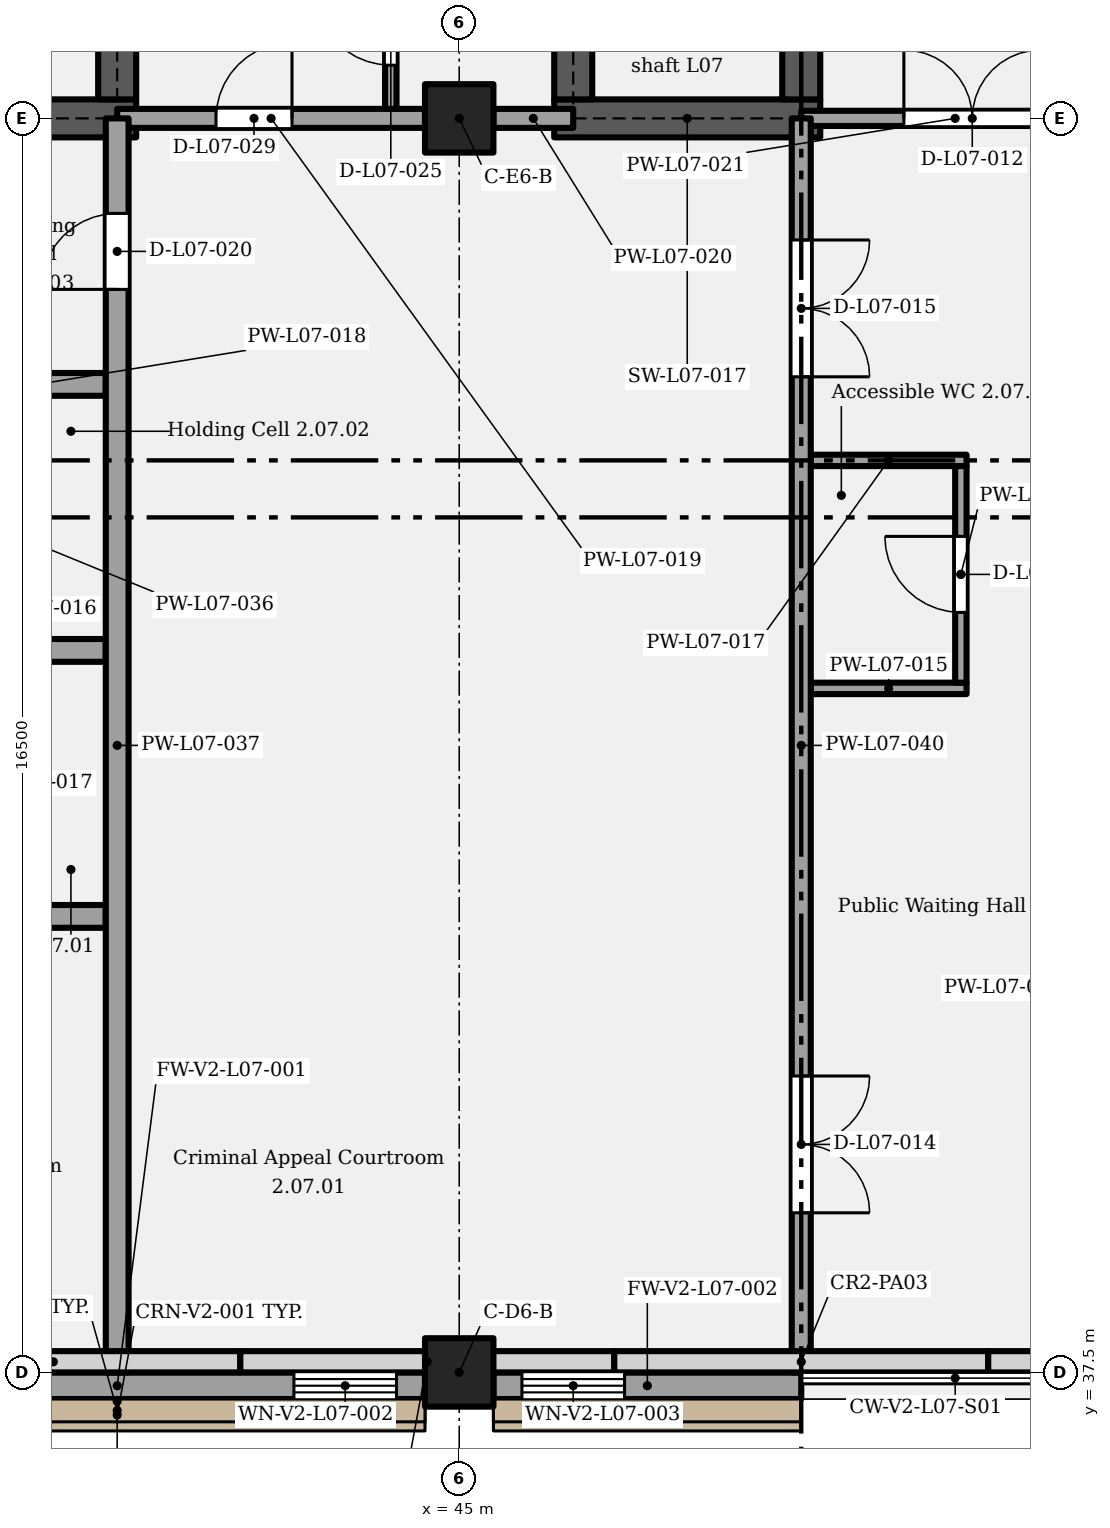
"""IFC4 building model, lengths in metres.
Left out: names, types, materials, properties, quantities, classifications, styles, units other than length and angle.
Written with IfcOpenShell. Run it as: python <this file> out.ifc"""

import sys

from ifc_helpers import new_model, si_unit, direction, frame, frame_2d, origin, origin_2d, place, context, subcontext, project, spatial, rectangle, extrude, element, fill, save


model = new_model("IFC4")
c1 = context("Model", 3, precision=1e-05, world=origin(), true_north=direction((0.0, 1.0)))
c2 = subcontext(c1, "Body", "Model", "MODEL_VIEW")
j1 = project(units=[si_unit("LENGTHUNIT", "METRE"), si_unit("PLANEANGLEUNIT", "RADIAN")], contexts=[c1])
p1 = place(None, origin())
s1 = spatial("IfcSite", under=j1, at=p1, CompositionType="ELEMENT")
p2 = place(p1, origin())
s2 = spatial("IfcBuilding", under=s1, at=p2, CompositionType="ELEMENT")
p3 = place(p2, frame((0.0, 0.0, 39.0)))
s3 = spatial("IfcBuildingStorey", under=s2, at=p3, CompositionType="ELEMENT", Elevation=39.0)
for number, where, z_axis, x_axis in (
    (1, (45.0, 37.5, 0.0), (0.0, 0.0, 1.0), (1.0, 0.0, 0.0)),
    (2, (45.0, 54.0, 0.0), (0.0, 0.0, 1.0), (1.0, 0.0, 0.0)),
):
    element("IfcColumn", number, at=place(p3, frame(where, z_axis=z_axis, x_axis=x_axis)), inside=s3, PredefinedType="COLUMN", context=c2, shape_type="SweptSolid", body=[
        extrude(rectangle(XDim=0.9, YDim=0.9, at=origin_2d()), origin(), (0.0, 0.0, 1.0), 5.4),
    ])
p4 = place(p3, frame((38.15, 54.0, 0.0), z_axis=(0.0, 0.0, 1.0), x_axis=(1.0, 0.0, 0.0)))
e3 = element("IfcWall", 3, at=p4, inside=s3, PredefinedType="SHEAR", context=c2, shape_type="SweptSolid", body=[
    extrude(rectangle(XDim=2.6, YDim=0.5, at=frame_2d((1.3, 0.0))), origin(), (0.0, 0.0, 1.0), 5.15),
])
p5 = place(p3, frame((46.25, 54.0, 0.0), z_axis=(0.0, 0.0, 1.0), x_axis=(1.0, 0.0, 0.0)))
e4 = element("IfcWall", 4, at=p5, inside=s3, PredefinedType="SHEAR", context=c2, shape_type="SweptSolid", body=[
    extrude(rectangle(XDim=3.5, YDim=0.5, at=frame_2d((1.75, 0.0))), origin(), (0.0, 0.0, 1.0), 5.15),
])
p6 = place(p3, frame((40.5, 54.25, 0.0), z_axis=(0.0, 0.0, 1.0), x_axis=(0.0, 1.0, 0.0)))
e5 = element("IfcWall", 5, at=p6, inside=s3, PredefinedType="SHEAR", context=c2, shape_type="SweptSolid", body=[
    extrude(rectangle(XDim=11.5, YDim=0.5, at=frame_2d((5.75, 0.0))), origin(), (0.0, 0.0, 1.0), 5.15),
])
p7 = place(p3, frame((46.5, 54.25, 0.0), z_axis=(0.0, 0.0, 1.0), x_axis=(0.0, 1.0, 0.0)))
e6 = element("IfcWall", 6, at=p7, inside=s3, PredefinedType="SHEAR", context=c2, shape_type="SweptSolid", body=[
    extrude(rectangle(XDim=2.5, YDim=0.5, at=frame_2d((1.25, 0.0))), origin(), (0.0, 0.0, 1.0), 5.15),
])
p8 = place(p3, frame((49.5, 54.25, 0.0), z_axis=(0.0, 0.0, 1.0), x_axis=(0.0, 1.0, 0.0)))
e7 = element("IfcWall", 7, at=p8, inside=s3, PredefinedType="SHEAR", context=c2, shape_type="SweptSolid", body=[
    extrude(rectangle(XDim=11.5, YDim=0.5, at=frame_2d((5.75, 0.0))), origin(), (0.0, 0.0, 1.0), 5.15),
])
p9 = place(p8, frame((0.7, 0.0, 0.0)))
e8 = element("IfcOpeningElement", 8, at=p9, cuts=e7, PredefinedType="OPENING", context=c2, shape_type="SweptSolid", body=[
    extrude(rectangle(XDim=1.1, YDim=2.1, at=frame_2d((0.55, 1.05))), frame((0.0, 0.26, 0.0), z_axis=(0.0, -1.0, 0.0), x_axis=(1.0, 0.0, 0.0)), (0.0, 0.0, 1.0), 0.52),
])
p10 = place(p8, frame((4.35, 0.0, 0.0), z_axis=(0.0, 0.0, 1.0), x_axis=(-1.0, 0.0, 0.0)))
e9 = element("IfcOpeningElement", 9, at=p10, cuts=e7, PredefinedType="OPENING", context=c2, shape_type="SweptSolid", body=[
    extrude(rectangle(XDim=1.2, YDim=2.1, at=frame_2d((0.6, 1.05))), frame((0.0, 0.26, 0.0), z_axis=(0.0, -1.0, 0.0), x_axis=(1.0, 0.0, 0.0)), (0.0, 0.0, 1.0), 0.52),
])
p11 = place(p3, frame((36.45, 37.325, 0.0), z_axis=(0.0, 0.0, 1.0), x_axis=(1.0, 0.0, 0.0)))
e10 = element("IfcWall", 10, at=p11, inside=s3, PredefinedType="SOLIDWALL", context=c2, shape_type="SweptSolid", body=[
    extrude(rectangle(XDim=8.1, YDim=0.35, at=frame_2d((4.05, 0.0))), origin(), (0.0, 0.0, 1.0), 5.15),
])
p12 = place(p11, frame((0.375, 0.0, 1.2)))
e11 = element("IfcOpeningElement", 11, at=p12, cuts=e10, PredefinedType="OPENING", context=c2, shape_type="SweptSolid", body=[
    extrude(rectangle(XDim=1.35, YDim=3.0, at=frame_2d((0.675, 1.5))), frame((0.0, 0.185, 0.0), z_axis=(0.0, -1.0, 0.0), x_axis=(1.0, 0.0, 0.0)), (0.0, 0.0, 1.0), 0.37),
])
p13 = place(p11, frame((6.375, 0.0, 1.2)))
e12 = element("IfcOpeningElement", 12, at=p13, cuts=e10, PredefinedType="OPENING", context=c2, shape_type="SweptSolid", body=[
    extrude(rectangle(XDim=1.35, YDim=3.0, at=frame_2d((0.675, 1.5))), frame((0.0, 0.185, 0.0), z_axis=(0.0, -1.0, 0.0), x_axis=(1.0, 0.0, 0.0)), (0.0, 0.0, 1.0), 0.37),
])
p14 = place(p3, frame((45.45, 37.325, 0.0), z_axis=(0.0, 0.0, 1.0), x_axis=(1.0, 0.0, 0.0)))
e13 = element("IfcWall", 13, at=p14, inside=s3, PredefinedType="SOLIDWALL", context=c2, shape_type="SweptSolid", body=[
    extrude(rectangle(XDim=4.05, YDim=0.35, at=frame_2d((2.025, 0.0))), origin(), (0.0, 0.0, 1.0), 5.15),
])
p15 = place(p14, frame((0.375, 0.0, 1.2)))
e14 = element("IfcOpeningElement", 14, at=p15, cuts=e13, PredefinedType="OPENING", context=c2, shape_type="SweptSolid", body=[
    extrude(rectangle(XDim=1.35, YDim=3.0, at=frame_2d((0.675, 1.5))), frame((0.0, 0.185, 0.0), z_axis=(0.0, -1.0, 0.0), x_axis=(1.0, 0.0, 0.0)), (0.0, 0.0, 1.0), 0.37),
])
p16 = place(p3, frame((37.2, 37.64, 5.4), z_axis=(0.0, 0.0, 1.0), x_axis=(1.0, 0.0, 0.0)))
e15 = element("IfcWall", 15, at=p16, inside=s3, PredefinedType="PARAPET", context=c2, shape_type="SweptSolid", body=[
    extrude(rectangle(XDim=4.92, YDim=0.28, at=frame_2d((2.46, 0.0))), origin(), (0.0, 0.0, 1.0), 1.2),
])
p17 = place(p3, frame((42.12, 37.64, 5.4), z_axis=(0.0, 0.0, 1.0), x_axis=(1.0, 0.0, 0.0)))
e16 = element("IfcWall", 16, at=p17, inside=s3, PredefinedType="PARAPET", context=c2, shape_type="SweptSolid", body=[
    extrude(rectangle(XDim=4.92, YDim=0.28, at=frame_2d((2.46, 0.0))), origin(), (0.0, 0.0, 1.0), 1.4),
])
p18 = place(p3, frame((47.04, 37.64, 5.4), z_axis=(0.0, 0.0, 1.0), x_axis=(1.0, 0.0, 0.0)))
e17 = element("IfcWall", 17, at=p18, inside=s3, PredefinedType="PARAPET", context=c2, shape_type="SweptSolid", body=[
    extrude(rectangle(XDim=4.92, YDim=0.28, at=frame_2d((2.46, 0.0))), origin(), (0.0, 0.0, 1.0), 1.6),
])
p19 = place(p3, frame((51.96, 37.64, 5.4), z_axis=(0.0, 0.0, 1.0), x_axis=(1.0, 0.0, 0.0)))
e18 = element("IfcWall", 18, at=p19, inside=s3, PredefinedType="PARAPET", context=c2, shape_type="SweptSolid", body=[
    extrude(rectangle(XDim=4.92, YDim=0.28, at=frame_2d((2.46, 0.0))), origin(), (0.0, 0.0, 1.0), 1.4),
])
p20 = place(p3, frame((36.0, 43.5, 0.0), z_axis=(0.0, 0.0, 1.0), x_axis=(1.0, 0.0, 0.0)))
e19 = element("IfcWall", 19, at=p20, inside=s3, PredefinedType="PARTITIONING", context=c2, shape_type="SweptSolid", body=[
    extrude(rectangle(XDim=4.35, YDim=0.3, at=frame_2d((2.175, 0.0))), origin(), (0.0, 0.0, 1.0), 5.15),
])
p21 = place(p20, frame((1.35, 0.0, 0.0), z_axis=(0.0, 0.0, 1.0), x_axis=(-1.0, 0.0, 0.0)))
e20 = element("IfcOpeningElement", 20, at=p21, cuts=e19, PredefinedType="OPENING", context=c2, shape_type="SweptSolid", body=[
    extrude(rectangle(XDim=0.9, YDim=2.1, at=frame_2d((0.45, 1.05))), frame((0.0, 0.16, 0.0), z_axis=(0.0, -1.0, 0.0), x_axis=(1.0, 0.0, 0.0)), (0.0, 0.0, 1.0), 0.32),
])
p22 = place(p3, frame((49.625, 46.5, 0.0), z_axis=(0.0, 0.0, 1.0), x_axis=(1.0, 0.0, 0.0)))
e21 = element("IfcWall", 21, at=p22, inside=s3, PredefinedType="PARTITIONING", context=c2, shape_type="SweptSolid", body=[
    extrude(rectangle(XDim=2.05, YDim=0.15, at=frame_2d((1.025, 0.0))), origin(), (0.0, 0.0, 1.0), 5.15),
])
p23 = place(p3, frame((38.55, 47.0, 0.0), z_axis=(0.0, 0.0, 1.0), x_axis=(1.0, 0.0, 0.0)))
e22 = element("IfcWall", 22, at=p23, inside=s3, PredefinedType="PARTITIONING", context=c2, shape_type="SweptSolid", body=[
    extrude(rectangle(XDim=1.8, YDim=0.3, at=frame_2d((0.9, 0.0))), origin(), (0.0, 0.0, 1.0), 5.15),
])
p24 = place(p3, frame((49.625, 49.5, 0.0), z_axis=(0.0, 0.0, 1.0), x_axis=(1.0, 0.0, 0.0)))
e23 = element("IfcWall", 23, at=p24, inside=s3, PredefinedType="PARTITIONING", context=c2, shape_type="SweptSolid", body=[
    extrude(rectangle(XDim=2.05, YDim=0.15, at=frame_2d((1.025, 0.0))), origin(), (0.0, 0.0, 1.0), 5.15),
])
p25 = place(p3, frame((38.55, 50.5, 0.0), z_axis=(0.0, 0.0, 1.0), x_axis=(1.0, 0.0, 0.0)))
e24 = element("IfcWall", 24, at=p25, inside=s3, PredefinedType="PARTITIONING", context=c2, shape_type="SweptSolid", body=[
    extrude(rectangle(XDim=1.8, YDim=0.3, at=frame_2d((0.9, 0.0))), origin(), (0.0, 0.0, 1.0), 5.15),
])
p26 = place(p3, frame((40.5, 54.0, 0.0), z_axis=(0.0, 0.0, 1.0), x_axis=(1.0, 0.0, 0.0)))
e25 = element("IfcWall", 25, at=p26, inside=s3, PredefinedType="PARTITIONING", context=c2, shape_type="SweptSolid", body=[
    extrude(rectangle(XDim=4.05, YDim=0.25, at=frame_2d((2.025, 0.0))), origin(), (0.0, 0.0, 1.0), 4.4),
])
p27 = place(p26, frame((1.3, 0.0, 0.0)))
e26 = element("IfcOpeningElement", 26, at=p27, cuts=e25, PredefinedType="OPENING", context=c2, shape_type="SweptSolid", body=[
    extrude(rectangle(XDim=1.0, YDim=2.1, at=frame_2d((0.5, 1.05))), frame((0.0, 0.135, 0.0), z_axis=(0.0, -1.0, 0.0), x_axis=(1.0, 0.0, 0.0)), (0.0, 0.0, 1.0), 0.27),
])
p28 = place(p3, frame((45.45, 54.0, 0.0), z_axis=(0.0, 0.0, 1.0), x_axis=(1.0, 0.0, 0.0)))
e27 = element("IfcWall", 27, at=p28, inside=s3, PredefinedType="PARTITIONING", context=c2, shape_type="SweptSolid", body=[
    extrude(rectangle(XDim=1.05, YDim=0.25, at=frame_2d((0.525, 0.0))), origin(), (0.0, 0.0, 1.0), 4.4),
])
p29 = place(p3, frame((49.5, 54.0, 0.0), z_axis=(0.0, 0.0, 1.0), x_axis=(1.0, 0.0, 0.0)))
e28 = element("IfcWall", 28, at=p29, inside=s3, PredefinedType="PARTITIONING", context=c2, shape_type="SweptSolid", body=[
    extrude(rectangle(XDim=4.05, YDim=0.2, at=frame_2d((2.025, 0.0))), origin(), (0.0, 0.0, 1.0), 4.4),
])
p30 = place(p29, frame((1.35, 0.0, 0.0)))
e29 = element("IfcOpeningElement", 29, at=p30, cuts=e28, PredefinedType="OPENING", context=c2, shape_type="SweptSolid", body=[
    extrude(rectangle(XDim=1.8, YDim=2.1, at=frame_2d((0.9, 1.05))), frame((0.0, 0.11, 0.0), z_axis=(0.0, -1.0, 0.0), x_axis=(1.0, 0.0, 0.0)), (0.0, 0.0, 1.0), 0.22),
])
p31 = place(p3, frame((40.5, 37.5, 0.0), z_axis=(0.0, 0.0, 1.0), x_axis=(0.0, 1.0, 0.0)))
e30 = element("IfcWall", 30, at=p31, inside=s3, PredefinedType="PARTITIONING", context=c2, shape_type="SweptSolid", body=[
    extrude(rectangle(XDim=16.5, YDim=0.3, at=frame_2d((8.25, 0.0))), origin(), (0.0, 0.0, 1.0), 5.15),
])
p32 = place(p31, frame((14.25, 0.0, 0.0)))
e31 = element("IfcOpeningElement", 31, at=p32, cuts=e30, PredefinedType="OPENING", context=c2, shape_type="SweptSolid", body=[
    extrude(rectangle(XDim=1.0, YDim=2.0, at=frame_2d((0.5, 1.0))), frame((0.0, 0.16, 0.0), z_axis=(0.0, -1.0, 0.0), x_axis=(1.0, 0.0, 0.0)), (0.0, 0.0, 1.0), 0.32),
])
p33 = place(p3, frame((44.1, 54.125, 0.0), z_axis=(0.0, 0.0, 1.0), x_axis=(0.0, 1.0, 0.0)))
e32 = element("IfcWall", 32, at=p33, inside=s3, PredefinedType="PARTITIONING", context=c2, shape_type="SweptSolid", body=[
    extrude(rectangle(XDim=8.8, YDim=0.15, at=frame_2d((4.4, 0.0))), origin(), (0.0, 0.0, 1.0), 5.15),
])
p34 = place(p33, frame((0.575, 0.0, 0.0)))
e33 = element("IfcOpeningElement", 33, at=p34, cuts=e32, PredefinedType="OPENING", context=c2, shape_type="SweptSolid", body=[
    extrude(rectangle(XDim=1.0, YDim=2.1, at=frame_2d((0.5, 1.05))), frame((0.0, 0.085, 0.0), z_axis=(0.0, -1.0, 0.0), x_axis=(1.0, 0.0, 0.0)), (0.0, 0.0, 1.0), 0.17),
])
p35 = place(p33, frame((5.425, 0.0, 0.0)))
e34 = element("IfcOpeningElement", 34, at=p35, cuts=e32, PredefinedType="OPENING", context=c2, shape_type="SweptSolid", body=[
    extrude(rectangle(XDim=0.9, YDim=2.1, at=frame_2d((0.45, 1.05))), frame((0.0, 0.085, 0.0), z_axis=(0.0, -1.0, 0.0), x_axis=(1.0, 0.0, 0.0)), (0.0, 0.0, 1.0), 0.17),
])
p36 = place(p3, frame((49.5, 37.5, 0.0), z_axis=(0.0, 0.0, 1.0), x_axis=(0.0, 1.0, 0.0)))
e35 = element("IfcWall", 35, at=p36, inside=s3, PredefinedType="PARTITIONING", context=c2, shape_type="SweptSolid", body=[
    extrude(rectangle(XDim=16.5, YDim=0.25, at=frame_2d((8.25, 0.0))), origin(), (0.0, 0.0, 1.0), 5.15),
])
p37 = place(p36, frame((3.9, 0.0, 0.0), z_axis=(0.0, 0.0, 1.0), x_axis=(-1.0, 0.0, 0.0)))
e36 = element("IfcOpeningElement", 36, at=p37, cuts=e35, PredefinedType="OPENING", context=c2, shape_type="SweptSolid", body=[
    extrude(rectangle(XDim=1.8, YDim=2.4, at=frame_2d((0.9, 1.2))), frame((0.0, 0.135, 0.0), z_axis=(0.0, -1.0, 0.0), x_axis=(1.0, 0.0, 0.0)), (0.0, 0.0, 1.0), 0.27),
])
p38 = place(p36, frame((14.9, 0.0, 0.0), z_axis=(0.0, 0.0, 1.0), x_axis=(-1.0, 0.0, 0.0)))
e37 = element("IfcOpeningElement", 37, at=p38, cuts=e35, PredefinedType="OPENING", context=c2, shape_type="SweptSolid", body=[
    extrude(rectangle(XDim=1.8, YDim=2.4, at=frame_2d((0.9, 1.2))), frame((0.0, 0.135, 0.0), z_axis=(0.0, -1.0, 0.0), x_axis=(1.0, 0.0, 0.0)), (0.0, 0.0, 1.0), 0.27),
])
p39 = place(p3, frame((51.6, 46.575, 0.0), z_axis=(0.0, 0.0, 1.0), x_axis=(0.0, 1.0, 0.0)))
e38 = element("IfcWall", 38, at=p39, inside=s3, PredefinedType="PARTITIONING", context=c2, shape_type="SweptSolid", body=[
    extrude(rectangle(XDim=2.85, YDim=0.15, at=frame_2d((1.425, 0.0))), origin(), (0.0, 0.0, 1.0), 5.15),
])
p40 = place(p39, frame((0.925, 0.0, 0.0)))
e39 = element("IfcOpeningElement", 39, at=p40, cuts=e38, PredefinedType="OPENING", context=c2, shape_type="SweptSolid", body=[
    extrude(rectangle(XDim=1.0, YDim=2.1, at=frame_2d((0.5, 1.05))), frame((0.0, 0.085, 0.0), z_axis=(0.0, -1.0, 0.0), x_axis=(1.0, 0.0, 0.0)), (0.0, 0.0, 1.0), 0.17),
])
p41 = place(p13, origin())
e40 = element("IfcWindow", 40, at=p41, inside=s3, PartitioningType="SINGLE_PANEL", PredefinedType="WINDOW", context=c2, shape_type="SweptSolid", body=[
    extrude(rectangle(XDim=1.35, YDim=3.0, at=frame_2d((0.675, 1.5))), frame((0.0, 0.03, 0.0), z_axis=(0.0, -1.0, 0.0), x_axis=(1.0, 0.0, 0.0)), (0.0, 0.0, 1.0), 0.06),
])
fill(e12, e40)
p42 = place(p15, origin())
e41 = element("IfcWindow", 41, at=p42, inside=s3, PartitioningType="SINGLE_PANEL", PredefinedType="WINDOW", context=c2, shape_type="SweptSolid", body=[
    extrude(rectangle(XDim=1.35, YDim=3.0, at=frame_2d((0.675, 1.5))), frame((0.0, 0.03, 0.0), z_axis=(0.0, -1.0, 0.0), x_axis=(1.0, 0.0, 0.0)), (0.0, 0.0, 1.0), 0.06),
])
fill(e14, e41)
p43 = place(p30, origin())
e42 = element("IfcDoor", 42, at=p43, inside=s3, OperationType="DOUBLE_DOOR_SINGLE_SWING", PredefinedType="DOOR", context=c2, shape_type="SweptSolid", body=[
    extrude(rectangle(XDim=1.8, YDim=2.1, at=frame_2d((0.9, 1.05))), frame((0.0, 0.025, 0.0), z_axis=(0.0, -1.0, 0.0), x_axis=(1.0, 0.0, 0.0)), (0.0, 0.0, 1.0), 0.05),
])
fill(e29, e42)
p44 = place(p40, origin())
e43 = element("IfcDoor", 43, at=p44, inside=s3, OperationType="SINGLE_SWING_RIGHT", PredefinedType="DOOR", context=c2, shape_type="SweptSolid", body=[
    extrude(rectangle(XDim=1.0, YDim=2.1, at=frame_2d((0.5, 1.05))), frame((0.0, 0.025, 0.0), z_axis=(0.0, -1.0, 0.0), x_axis=(1.0, 0.0, 0.0)), (0.0, 0.0, 1.0), 0.05),
])
fill(e39, e43)
p45 = place(p37, origin())
e44 = element("IfcDoor", 44, at=p45, inside=s3, OperationType="DOUBLE_DOOR_SINGLE_SWING", PredefinedType="DOOR", context=c2, shape_type="SweptSolid", body=[
    extrude(rectangle(XDim=1.8, YDim=2.4, at=frame_2d((0.9, 1.2))), frame((0.0, 0.025, 0.0), z_axis=(0.0, -1.0, 0.0), x_axis=(1.0, 0.0, 0.0)), (0.0, 0.0, 1.0), 0.05),
])
fill(e36, e44)
p46 = place(p38, origin())
e45 = element("IfcDoor", 45, at=p46, inside=s3, OperationType="DOUBLE_DOOR_SINGLE_SWING", PredefinedType="DOOR", context=c2, shape_type="SweptSolid", body=[
    extrude(rectangle(XDim=1.8, YDim=2.4, at=frame_2d((0.9, 1.2))), frame((0.0, 0.025, 0.0), z_axis=(0.0, -1.0, 0.0), x_axis=(1.0, 0.0, 0.0)), (0.0, 0.0, 1.0), 0.05),
])
fill(e37, e45)
p47 = place(p32, origin())
e46 = element("IfcDoor", 46, at=p47, inside=s3, OperationType="SINGLE_SWING_LEFT", PredefinedType="DOOR", context=c2, shape_type="SweptSolid", body=[
    extrude(rectangle(XDim=1.0, YDim=2.0, at=frame_2d((0.5, 1.0))), frame((0.0, 0.025, 0.0), z_axis=(0.0, -1.0, 0.0), x_axis=(1.0, 0.0, 0.0)), (0.0, 0.0, 1.0), 0.05),
])
fill(e31, e46)
p48 = place(p34, origin())
e47 = element("IfcDoor", 47, at=p48, inside=s3, OperationType="SINGLE_SWING_RIGHT", PredefinedType="DOOR", context=c2, shape_type="SweptSolid", body=[
    extrude(rectangle(XDim=1.0, YDim=2.1, at=frame_2d((0.5, 1.05))), frame((0.0, 0.025, 0.0), z_axis=(0.0, -1.0, 0.0), x_axis=(1.0, 0.0, 0.0)), (0.0, 0.0, 1.0), 0.05),
])
fill(e33, e47)
p49 = place(p27, origin())
e48 = element("IfcDoor", 48, at=p49, inside=s3, OperationType="SINGLE_SWING_RIGHT", PredefinedType="DOOR", context=c2, shape_type="SweptSolid", body=[
    extrude(rectangle(XDim=1.0, YDim=2.1, at=frame_2d((0.5, 1.05))), frame((0.0, 0.025, 0.0), z_axis=(0.0, -1.0, 0.0), x_axis=(1.0, 0.0, 0.0)), (0.0, 0.0, 1.0), 0.05),
])
fill(e26, e48)
save(model, sys.argv[1])
